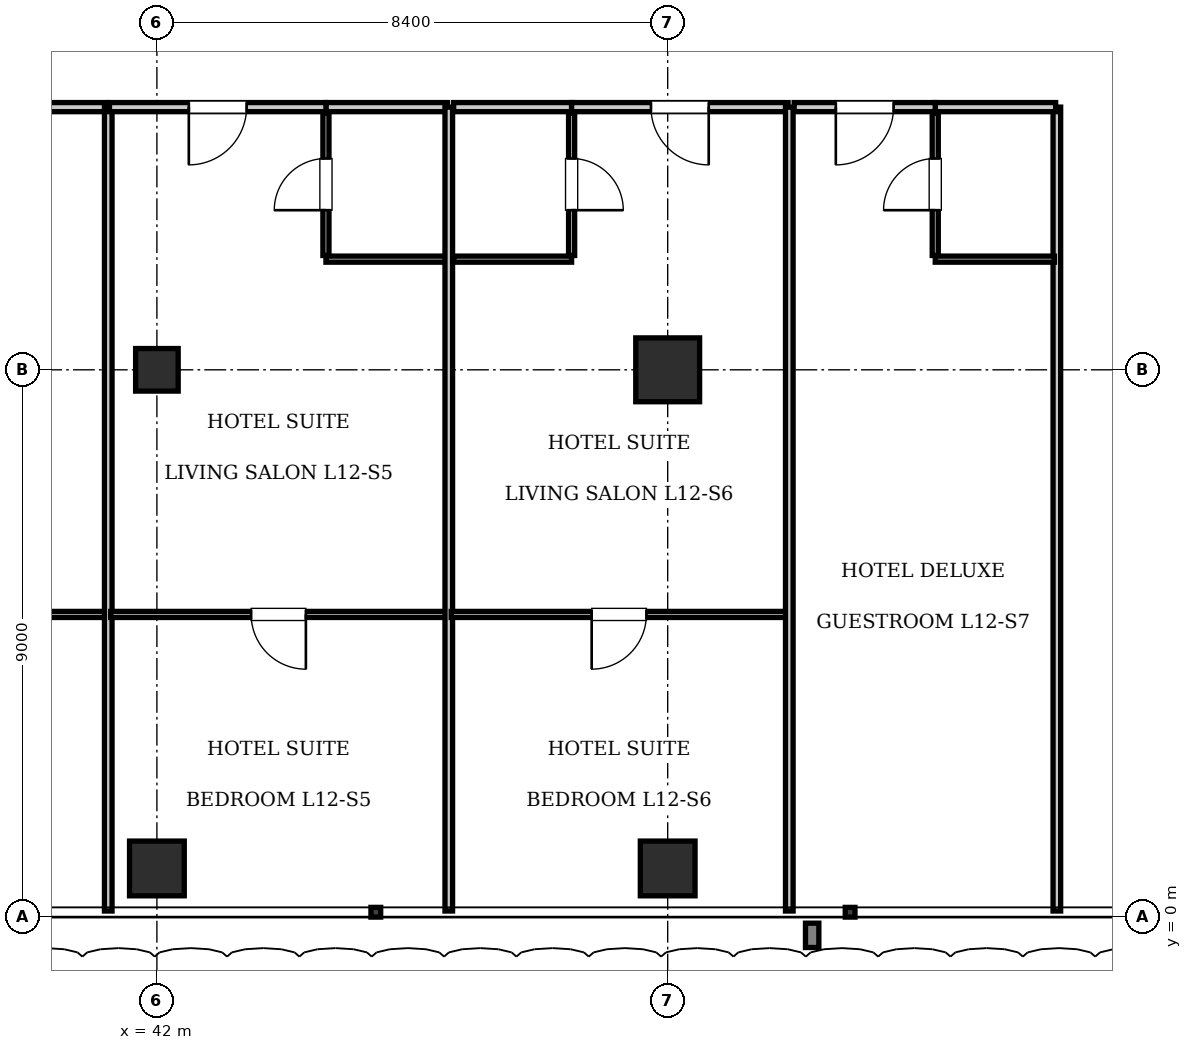
"""IFC4 building model, lengths in metres.
Left out: names, types, materials, properties, quantities, classifications, styles, units other than length and angle.
Written with IfcOpenShell. Run it as: python <this file> out.ifc"""

import sys

from ifc_helpers import new_model, si_unit, direction, frame, frame_2d, origin, origin_2d, place, context, subcontext, project, spatial, rectangle, i_section, extrude, element, fill, save


model = new_model("IFC4")
c1 = context("Model", 3, precision=1e-05, world=origin(), true_north=direction((0.0, 1.0)))
c2 = subcontext(c1, "Body", "Model", "MODEL_VIEW")
j1 = project(units=[si_unit("LENGTHUNIT", "METRE"), si_unit("PLANEANGLEUNIT", "RADIAN")], contexts=[c1])
p1 = place(None, origin())
s1 = spatial("IfcSite", under=j1, at=p1, CompositionType="ELEMENT")
p2 = place(p1, origin())
s2 = spatial("IfcBuilding", under=s1, at=p2, CompositionType="ELEMENT")
p3 = place(p2, frame((0.0, 0.0, 53.9)))
s3 = spatial("IfcBuildingStorey", under=s2, at=p3, CompositionType="ELEMENT", Elevation=53.9)
p4 = place(p3, frame((50.4, 9.0, 0.0), z_axis=(0.0, 0.0, 1.0), x_axis=(1.0, 0.0, 0.0)))
e1 = element("IfcColumn", 1, at=p4, inside=s3, PredefinedType="COLUMN", context=c2, shape_type="SweptSolid", body=[
    extrude(rectangle(XDim=1.05, YDim=1.05, at=origin_2d()), origin(), (0.0, 0.0, 1.0), 3.85),
])
p5 = place(p3, frame((42.0, 9.0, 0.0), z_axis=(0.0, 0.0, 1.0), x_axis=(1.0, 0.0, 0.0)))
e2 = element("IfcColumn", 2, at=p5, inside=s3, PredefinedType="COLUMN", context=c2, shape_type="SweptSolid", body=[
    extrude(i_section(OverallWidth=0.7, OverallDepth=0.7, WebThickness=0.028, FlangeThickness=0.044, at=origin_2d()), origin(), (0.0, 0.0, 1.0), 3.85),
])
for number, where, z_axis, x_axis in (
    (3, (42.0, 0.8, 0.0), (0.0, 0.0, 1.0), (1.0, 0.0, 0.0)),
    (4, (50.4, 0.8, 0.0), (0.0, 0.0, 1.0), (1.0, 0.0, 0.0)),
):
    element("IfcColumn", number, at=place(p3, frame(where, z_axis=z_axis, x_axis=x_axis)), inside=s3, PredefinedType="COLUMN", context=c2, shape_type="SweptSolid", body=[
        extrude(rectangle(XDim=0.9, YDim=0.9, at=origin_2d()), origin(), (0.0, 0.0, 1.0), 3.85),
    ])
p6 = place(p3, frame((56.8, 0.1, 0.0), z_axis=(0.0, 0.0, 1.0), x_axis=(0.0, 1.0, 0.0)))
e5 = element("IfcWall", 5, at=p6, inside=s3, PredefinedType="PARTITIONING", context=c2, shape_type="SweptSolid", body=[
    extrude(rectangle(XDim=13.22, YDim=0.125, at=frame_2d((6.61, 0.0))), origin(), (0.0, 0.0, 1.0), 3.61),
])
p7 = place(p3, frame((37.62, 13.32, 0.0), z_axis=(0.0, 0.0, 1.0), x_axis=(1.0, 0.0, 0.0)))
e6 = element("IfcWall", 6, at=p7, inside=s3, PredefinedType="PARTITIONING", context=c2, shape_type="SweptSolid", body=[
    extrude(rectangle(XDim=3.56, YDim=0.15, at=frame_2d((1.78, 0.0))), origin(), (0.0, 0.0, 1.0), 3.61),
])
p8 = place(p7, frame((1.305, 0.0, 0.0)))
e7 = element("IfcOpeningElement", 7, at=p8, cuts=e6, PredefinedType="OPENING", context=c2, shape_type="SweptSolid", body=[
    extrude(rectangle(XDim=0.95, YDim=2.15, at=frame_2d((0.475, 1.075))), frame((0.0, 0.085, 0.0), z_axis=(0.0, -1.0, 0.0), x_axis=(1.0, 0.0, 0.0)), (0.0, 0.0, 1.0), 0.17),
])
p9 = place(p3, frame((35.64, 4.977, 0.0), z_axis=(0.0, 0.0, 1.0), x_axis=(1.0, 0.0, 0.0)))
e8 = element("IfcWall", 8, at=p9, inside=s3, PredefinedType="PARTITIONING", context=c2, shape_type="SweptSolid", body=[
    extrude(rectangle(XDim=5.52, YDim=0.1, at=frame_2d((2.76, 0.0))), origin(), (0.0, 0.0, 1.0), 3.61),
])
p10 = place(p9, frame((2.31, 0.0, 0.0)))
e9 = element("IfcOpeningElement", 9, at=p10, cuts=e8, PredefinedType="OPENING", context=c2, shape_type="SweptSolid", body=[
    extrude(rectangle(XDim=0.9, YDim=2.1, at=frame_2d((0.45, 1.05))), frame((0.0, 0.06, 0.0), z_axis=(0.0, -1.0, 0.0), x_axis=(1.0, 0.0, 0.0)), (0.0, 0.0, 1.0), 0.12),
])
p11 = place(p3, frame((41.2, 0.1, 0.0), z_axis=(0.0, 0.0, 1.0), x_axis=(0.0, 1.0, 0.0)))
e10 = element("IfcWall", 10, at=p11, inside=s3, PredefinedType="PARTITIONING", context=c2, shape_type="SweptSolid", body=[
    extrude(rectangle(XDim=13.22, YDim=0.125, at=frame_2d((6.61, 0.0))), origin(), (0.0, 0.0, 1.0), 3.61),
])
p12 = place(p3, frame((44.78, 13.32, 0.0), z_axis=(0.0, 0.0, 1.0), x_axis=(1.0, 0.0, 0.0)))
e11 = element("IfcWall", 11, at=p12, inside=s3, PredefinedType="PARTITIONING", context=c2, shape_type="SweptSolid", body=[
    extrude(rectangle(XDim=2.0, YDim=0.15, at=frame_2d((1.0, 0.0))), origin(), (0.0, 0.0, 1.0), 3.61),
])
p13 = place(p3, frame((44.78, 10.82, 0.0), z_axis=(0.0, 0.0, 1.0), x_axis=(1.0, 0.0, 0.0)))
e12 = element("IfcWall", 12, at=p13, inside=s3, PredefinedType="PARTITIONING", context=c2, shape_type="SweptSolid", body=[
    extrude(rectangle(XDim=1.98, YDim=0.1, at=frame_2d((0.99, 0.0))), origin(), (0.0, 0.0, 1.0), 3.61),
])
p14 = place(p3, frame((44.78, 10.88, 0.0), z_axis=(0.0, 0.0, 1.0), x_axis=(0.0, 1.0, 0.0)))
e13 = element("IfcWall", 13, at=p14, inside=s3, PredefinedType="PARTITIONING", context=c2, shape_type="SweptSolid", body=[
    extrude(rectangle(XDim=2.34, YDim=0.1, at=frame_2d((1.17, 0.0))), origin(), (0.0, 0.0, 1.0), 3.61),
])
p15 = place(p14, frame((0.745, 0.0, 0.0)))
e14 = element("IfcOpeningElement", 14, at=p15, cuts=e13, PredefinedType="OPENING", context=c2, shape_type="SweptSolid", body=[
    extrude(rectangle(XDim=0.85, YDim=2.1, at=frame_2d((0.425, 1.05))), frame((0.0, 0.06, 0.0), z_axis=(0.0, -1.0, 0.0), x_axis=(1.0, 0.0, 0.0)), (0.0, 0.0, 1.0), 0.12),
])
p16 = place(p3, frame((41.22, 13.32, 0.0), z_axis=(0.0, 0.0, 1.0), x_axis=(1.0, 0.0, 0.0)))
e15 = element("IfcWall", 15, at=p16, inside=s3, PredefinedType="PARTITIONING", context=c2, shape_type="SweptSolid", body=[
    extrude(rectangle(XDim=3.56, YDim=0.15, at=frame_2d((1.78, 0.0))), origin(), (0.0, 0.0, 1.0), 3.61),
])
p17 = place(p16, frame((1.305, 0.0, 0.0)))
e16 = element("IfcOpeningElement", 16, at=p17, cuts=e15, PredefinedType="OPENING", context=c2, shape_type="SweptSolid", body=[
    extrude(rectangle(XDim=0.95, YDim=2.15, at=frame_2d((0.475, 1.075))), frame((0.0, 0.085, 0.0), z_axis=(0.0, -1.0, 0.0), x_axis=(1.0, 0.0, 0.0)), (0.0, 0.0, 1.0), 0.17),
])
p18 = place(p3, frame((41.24, 4.977, 0.0), z_axis=(0.0, 0.0, 1.0), x_axis=(1.0, 0.0, 0.0)))
e17 = element("IfcWall", 17, at=p18, inside=s3, PredefinedType="PARTITIONING", context=c2, shape_type="SweptSolid", body=[
    extrude(rectangle(XDim=5.52, YDim=0.1, at=frame_2d((2.76, 0.0))), origin(), (0.0, 0.0, 1.0), 3.61),
])
p19 = place(p18, frame((2.31, 0.0, 0.0)))
e18 = element("IfcOpeningElement", 18, at=p19, cuts=e17, PredefinedType="OPENING", context=c2, shape_type="SweptSolid", body=[
    extrude(rectangle(XDim=0.9, YDim=2.1, at=frame_2d((0.45, 1.05))), frame((0.0, 0.06, 0.0), z_axis=(0.0, -1.0, 0.0), x_axis=(1.0, 0.0, 0.0)), (0.0, 0.0, 1.0), 0.12),
])
p20 = place(p3, frame((46.8, 0.1, 0.0), z_axis=(0.0, 0.0, 1.0), x_axis=(0.0, 1.0, 0.0)))
e19 = element("IfcWall", 19, at=p20, inside=s3, PredefinedType="PARTITIONING", context=c2, shape_type="SweptSolid", body=[
    extrude(rectangle(XDim=13.22, YDim=0.125, at=frame_2d((6.61, 0.0))), origin(), (0.0, 0.0, 1.0), 3.61),
])
p21 = place(p3, frame((46.88, 13.32, 0.0), z_axis=(0.0, 0.0, 1.0), x_axis=(1.0, 0.0, 0.0)))
e20 = element("IfcWall", 20, at=p21, inside=s3, PredefinedType="PARTITIONING", context=c2, shape_type="SweptSolid", body=[
    extrude(rectangle(XDim=1.94, YDim=0.15, at=frame_2d((0.97, 0.0))), origin(), (0.0, 0.0, 1.0), 3.61),
])
p22 = place(p3, frame((46.88, 10.82, 0.0), z_axis=(0.0, 0.0, 1.0), x_axis=(1.0, 0.0, 0.0)))
e21 = element("IfcWall", 21, at=p22, inside=s3, PredefinedType="PARTITIONING", context=c2, shape_type="SweptSolid", body=[
    extrude(rectangle(XDim=1.94, YDim=0.1, at=frame_2d((0.97, 0.0))), origin(), (0.0, 0.0, 1.0), 3.61),
])
p23 = place(p3, frame((48.82, 10.88, 0.0), z_axis=(0.0, 0.0, 1.0), x_axis=(0.0, 1.0, 0.0)))
e22 = element("IfcWall", 22, at=p23, inside=s3, PredefinedType="PARTITIONING", context=c2, shape_type="SweptSolid", body=[
    extrude(rectangle(XDim=2.34, YDim=0.1, at=frame_2d((1.17, 0.0))), origin(), (0.0, 0.0, 1.0), 3.61),
])
p24 = place(p23, frame((0.745, 0.0, 0.0)))
e23 = element("IfcOpeningElement", 23, at=p24, cuts=e22, PredefinedType="OPENING", context=c2, shape_type="SweptSolid", body=[
    extrude(rectangle(XDim=0.85, YDim=2.1, at=frame_2d((0.425, 1.05))), frame((0.0, 0.06, 0.0), z_axis=(0.0, -1.0, 0.0), x_axis=(1.0, 0.0, 0.0)), (0.0, 0.0, 1.0), 0.12),
])
p25 = place(p3, frame((48.82, 13.32, 0.0), z_axis=(0.0, 0.0, 1.0), x_axis=(1.0, 0.0, 0.0)))
e24 = element("IfcWall", 24, at=p25, inside=s3, PredefinedType="PARTITIONING", context=c2, shape_type="SweptSolid", body=[
    extrude(rectangle(XDim=3.56, YDim=0.15, at=frame_2d((1.78, 0.0))), origin(), (0.0, 0.0, 1.0), 3.61),
])
p26 = place(p25, frame((1.305, 0.0, 0.0)))
e25 = element("IfcOpeningElement", 25, at=p26, cuts=e24, PredefinedType="OPENING", context=c2, shape_type="SweptSolid", body=[
    extrude(rectangle(XDim=0.95, YDim=2.15, at=frame_2d((0.475, 1.075))), frame((0.0, 0.085, 0.0), z_axis=(0.0, -1.0, 0.0), x_axis=(1.0, 0.0, 0.0)), (0.0, 0.0, 1.0), 0.17),
])
p27 = place(p3, frame((46.84, 4.977, 0.0), z_axis=(0.0, 0.0, 1.0), x_axis=(1.0, 0.0, 0.0)))
e26 = element("IfcWall", 26, at=p27, inside=s3, PredefinedType="PARTITIONING", context=c2, shape_type="SweptSolid", body=[
    extrude(rectangle(XDim=5.52, YDim=0.1, at=frame_2d((2.76, 0.0))), origin(), (0.0, 0.0, 1.0), 3.61),
])
p28 = place(p27, frame((2.31, 0.0, 0.0)))
e27 = element("IfcOpeningElement", 27, at=p28, cuts=e26, PredefinedType="OPENING", context=c2, shape_type="SweptSolid", body=[
    extrude(rectangle(XDim=0.9, YDim=2.1, at=frame_2d((0.45, 1.05))), frame((0.0, 0.06, 0.0), z_axis=(0.0, -1.0, 0.0), x_axis=(1.0, 0.0, 0.0)), (0.0, 0.0, 1.0), 0.12),
])
p29 = place(p3, frame((52.4, 0.1, 0.0), z_axis=(0.0, 0.0, 1.0), x_axis=(0.0, 1.0, 0.0)))
e28 = element("IfcWall", 28, at=p29, inside=s3, PredefinedType="PARTITIONING", context=c2, shape_type="SweptSolid", body=[
    extrude(rectangle(XDim=13.22, YDim=0.125, at=frame_2d((6.61, 0.0))), origin(), (0.0, 0.0, 1.0), 3.61),
])
p30 = place(p3, frame((54.8, 13.32, 0.0), z_axis=(0.0, 0.0, 1.0), x_axis=(1.0, 0.0, 0.0)))
e29 = element("IfcWall", 29, at=p30, inside=s3, PredefinedType="PARTITIONING", context=c2, shape_type="SweptSolid", body=[
    extrude(rectangle(XDim=1.98, YDim=0.15, at=frame_2d((0.99, 0.0))), origin(), (0.0, 0.0, 1.0), 3.61),
])
p31 = place(p3, frame((54.8, 10.82, 0.0), z_axis=(0.0, 0.0, 1.0), x_axis=(1.0, 0.0, 0.0)))
e30 = element("IfcWall", 30, at=p31, inside=s3, PredefinedType="PARTITIONING", context=c2, shape_type="SweptSolid", body=[
    extrude(rectangle(XDim=1.96, YDim=0.1, at=frame_2d((0.98, 0.0))), origin(), (0.0, 0.0, 1.0), 3.61),
])
p32 = place(p3, frame((54.8, 10.88, 0.0), z_axis=(0.0, 0.0, 1.0), x_axis=(0.0, 1.0, 0.0)))
e31 = element("IfcWall", 31, at=p32, inside=s3, PredefinedType="PARTITIONING", context=c2, shape_type="SweptSolid", body=[
    extrude(rectangle(XDim=2.34, YDim=0.1, at=frame_2d((1.17, 0.0))), origin(), (0.0, 0.0, 1.0), 3.61),
])
p33 = place(p32, frame((0.745, 0.0, 0.0)))
e32 = element("IfcOpeningElement", 32, at=p33, cuts=e31, PredefinedType="OPENING", context=c2, shape_type="SweptSolid", body=[
    extrude(rectangle(XDim=0.85, YDim=2.1, at=frame_2d((0.425, 1.05))), frame((0.0, 0.06, 0.0), z_axis=(0.0, -1.0, 0.0), x_axis=(1.0, 0.0, 0.0)), (0.0, 0.0, 1.0), 0.12),
])
p34 = place(p3, frame((52.48, 13.32, 0.0), z_axis=(0.0, 0.0, 1.0), x_axis=(1.0, 0.0, 0.0)))
e33 = element("IfcWall", 33, at=p34, inside=s3, PredefinedType="PARTITIONING", context=c2, shape_type="SweptSolid", body=[
    extrude(rectangle(XDim=2.32, YDim=0.15, at=frame_2d((1.16, 0.0))), origin(), (0.0, 0.0, 1.0), 3.61),
])
p35 = place(p34, frame((0.685, 0.0, 0.0)))
e34 = element("IfcOpeningElement", 34, at=p35, cuts=e33, PredefinedType="OPENING", context=c2, shape_type="SweptSolid", body=[
    extrude(rectangle(XDim=0.95, YDim=2.15, at=frame_2d((0.475, 1.075))), frame((0.0, 0.085, 0.0), z_axis=(0.0, -1.0, 0.0), x_axis=(1.0, 0.0, 0.0)), (0.0, 0.0, 1.0), 0.17),
])
p36 = place(p15, origin())
e35 = element("IfcDoor", 35, at=p36, inside=s3, OperationType="SINGLE_SWING_LEFT", PredefinedType="DOOR", context=c2, shape_type="SweptSolid", body=[
    extrude(rectangle(XDim=0.85, YDim=2.1, at=frame_2d((0.425, 1.05))), frame((0.0, 0.025, 0.0), z_axis=(0.0, -1.0, 0.0), x_axis=(1.0, 0.0, 0.0)), (0.0, 0.0, 1.0), 0.05),
])
fill(e14, e35)
p37 = place(p17, frame((0.95, 0.0, 0.0), z_axis=(0.0, 0.0, 1.0), x_axis=(-1.0, 0.0, 0.0)))
e36 = element("IfcDoor", 36, at=p37, inside=s3, OperationType="SINGLE_SWING_RIGHT", PredefinedType="DOOR", context=c2, shape_type="SweptSolid", body=[
    extrude(rectangle(XDim=0.95, YDim=2.15, at=frame_2d((0.475, 1.075))), frame((0.0, 0.025, 0.0), z_axis=(0.0, -1.0, 0.0), x_axis=(1.0, 0.0, 0.0)), (0.0, 0.0, 1.0), 0.05),
])
fill(e16, e36)
p38 = place(p19, frame((0.9, 0.0, 0.0), z_axis=(0.0, 0.0, 1.0), x_axis=(-1.0, 0.0, 0.0)))
e37 = element("IfcDoor", 37, at=p38, inside=s3, OperationType="SINGLE_SWING_LEFT", PredefinedType="DOOR", context=c2, shape_type="SweptSolid", body=[
    extrude(rectangle(XDim=0.9, YDim=2.1, at=frame_2d((0.45, 1.05))), frame((0.0, 0.025, 0.0), z_axis=(0.0, -1.0, 0.0), x_axis=(1.0, 0.0, 0.0)), (0.0, 0.0, 1.0), 0.05),
])
fill(e18, e37)
p39 = place(p24, frame((0.85, 0.0, 0.0), z_axis=(0.0, 0.0, 1.0), x_axis=(-1.0, 0.0, 0.0)))
e38 = element("IfcDoor", 38, at=p39, inside=s3, OperationType="SINGLE_SWING_RIGHT", PredefinedType="DOOR", context=c2, shape_type="SweptSolid", body=[
    extrude(rectangle(XDim=0.85, YDim=2.1, at=frame_2d((0.425, 1.05))), frame((0.0, 0.025, 0.0), z_axis=(0.0, -1.0, 0.0), x_axis=(1.0, 0.0, 0.0)), (0.0, 0.0, 1.0), 0.05),
])
fill(e23, e38)
p40 = place(p26, frame((0.95, 0.0, 0.0), z_axis=(0.0, 0.0, 1.0), x_axis=(-1.0, 0.0, 0.0)))
e39 = element("IfcDoor", 39, at=p40, inside=s3, OperationType="SINGLE_SWING_LEFT", PredefinedType="DOOR", context=c2, shape_type="SweptSolid", body=[
    extrude(rectangle(XDim=0.95, YDim=2.15, at=frame_2d((0.475, 1.075))), frame((0.0, 0.025, 0.0), z_axis=(0.0, -1.0, 0.0), x_axis=(1.0, 0.0, 0.0)), (0.0, 0.0, 1.0), 0.05),
])
fill(e25, e39)
p41 = place(p28, frame((0.9, 0.0, 0.0), z_axis=(0.0, 0.0, 1.0), x_axis=(-1.0, 0.0, 0.0)))
e40 = element("IfcDoor", 40, at=p41, inside=s3, OperationType="SINGLE_SWING_RIGHT", PredefinedType="DOOR", context=c2, shape_type="SweptSolid", body=[
    extrude(rectangle(XDim=0.9, YDim=2.1, at=frame_2d((0.45, 1.05))), frame((0.0, 0.025, 0.0), z_axis=(0.0, -1.0, 0.0), x_axis=(1.0, 0.0, 0.0)), (0.0, 0.0, 1.0), 0.05),
])
fill(e27, e40)
p42 = place(p33, origin())
e41 = element("IfcDoor", 41, at=p42, inside=s3, OperationType="SINGLE_SWING_LEFT", PredefinedType="DOOR", context=c2, shape_type="SweptSolid", body=[
    extrude(rectangle(XDim=0.85, YDim=2.1, at=frame_2d((0.425, 1.05))), frame((0.0, 0.025, 0.0), z_axis=(0.0, -1.0, 0.0), x_axis=(1.0, 0.0, 0.0)), (0.0, 0.0, 1.0), 0.05),
])
fill(e32, e41)
p43 = place(p35, frame((0.95, 0.0, 0.0), z_axis=(0.0, 0.0, 1.0), x_axis=(-1.0, 0.0, 0.0)))
e42 = element("IfcDoor", 42, at=p43, inside=s3, OperationType="SINGLE_SWING_RIGHT", PredefinedType="DOOR", context=c2, shape_type="SweptSolid", body=[
    extrude(rectangle(XDim=0.95, YDim=2.15, at=frame_2d((0.475, 1.075))), frame((0.0, 0.025, 0.0), z_axis=(0.0, -1.0, 0.0), x_axis=(1.0, 0.0, 0.0)), (0.0, 0.0, 1.0), 0.05),
])
fill(e34, e42)
save(model, sys.argv[1])
